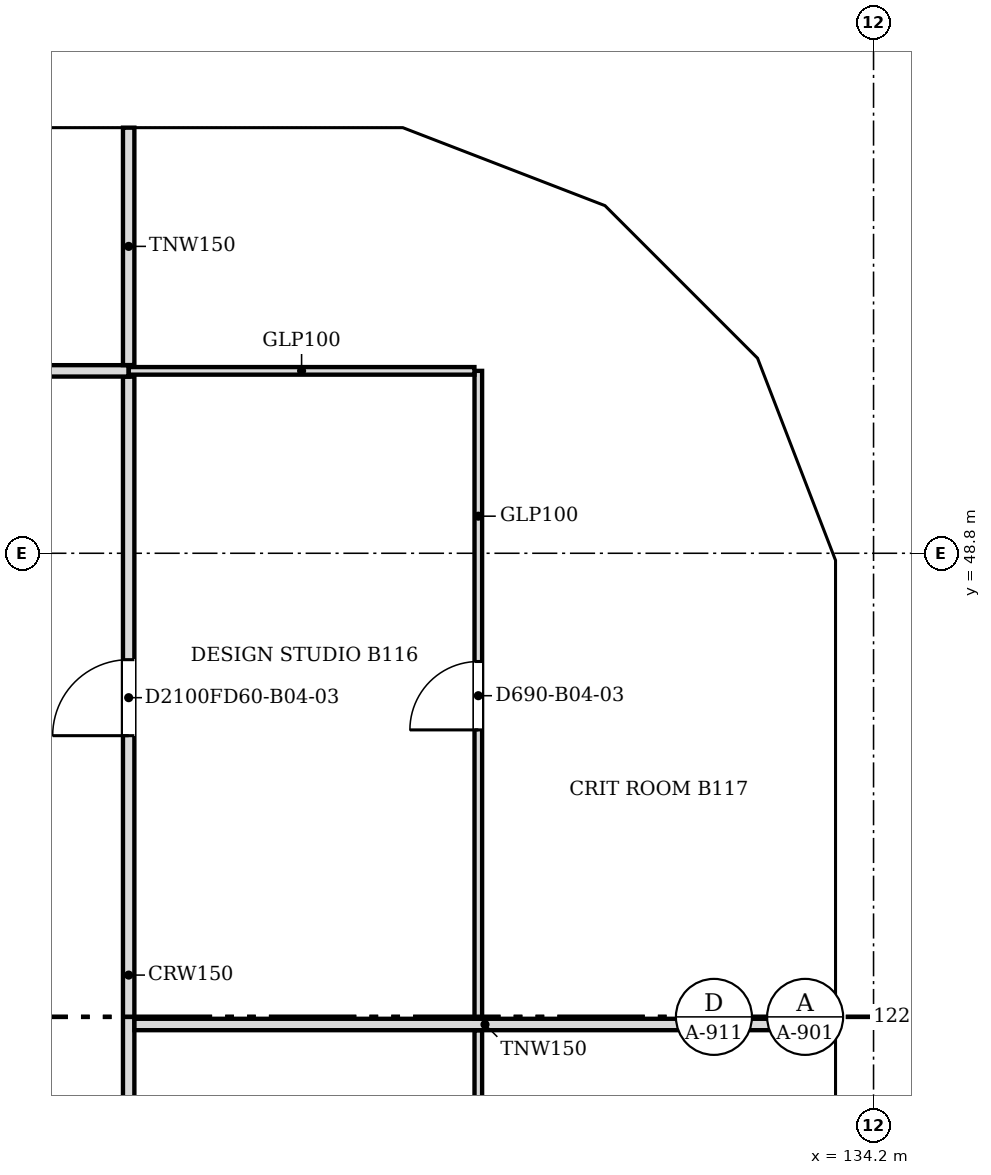
"""IFC4 building model, lengths in metres.
Left out: names, types, materials, properties, quantities, classifications, styles, units other than length and angle.
Written with IfcOpenShell. Run it as: python <this file> out.ifc"""

import sys

from ifc_helpers import new_model, si_unit, direction, frame, frame_2d, origin, place, context, subcontext, project, spatial, polyline, rectangle, outline, extrude, faceted_brep, source, transform, mapped, element, fill, save


model = new_model("IFC4")
c1 = context("Model", 3, precision=1e-05, world=origin(), true_north=direction((0.0, 1.0)))
c2 = subcontext(c1, "Body", "Model", "MODEL_VIEW")
j1 = project(units=[si_unit("LENGTHUNIT", "METRE"), si_unit("PLANEANGLEUNIT", "RADIAN")], contexts=[c1])
p1 = place(None, origin())
s1 = spatial("IfcSite", under=j1, at=p1, CompositionType="ELEMENT")
p2 = place(p1, origin())
s2 = spatial("IfcBuilding", under=s1, at=p2, CompositionType="ELEMENT")
p3 = place(p2, frame((0.0, 0.0, 41.0)))
s3 = spatial("IfcBuildingStorey", under=s2, at=p3, CompositionType="ELEMENT", Elevation=41.0)
m1 = source(origin(), c2, "Body", "Brep", [
    faceted_brep([(3.05, -0.25, 0.0), (6.1, -0.25, 3.8), (6.1, -0.25, 3.8), (3.05, -0.25, 7.6), (0.0, -0.25, 3.8), (0.0, 0.25, 3.8), (3.05, 0.25, 7.6), (6.1, 0.25, 3.8), (6.1, 0.25, 3.8), (3.05, 0.25, 0.0)], [[[0, 1, 2, 3, 4]], [[5, 6, 7, 8, 9]], [[9, 8, 1, 0]], [[7, 6, 3, 2]], [[6, 5, 4, 3]], [[5, 9, 0, 4]], [[1, 8, 7, 2]]]),
])
p4 = place(p3, frame((133.95, 36.6, -3.8), z_axis=(0.0, 0.0, 1.0), x_axis=(0.0, 1.0, 0.0)))
e1 = element("IfcWall", 1, at=p4, inside=s3, PredefinedType="SOLIDWALL", context=c2, shape_type="MappedRepresentation", body=[
    mapped(m1, transform((0.0, 0.0, 0.0), scale=1.0)),
])
m2 = source(origin(), c2, "Body", "SweptSolid", [
    extrude(outline(polyline([(3.05, 0.399), (5.78, 3.8), (3.05, 7.201), (0.321, 3.8), (3.05, 0.399)])), frame((0.0, 0.26, 0.0), z_axis=(0.0, -1.0, 0.0), x_axis=(1.0, 0.0, 0.0)), (0.0, 0.0, 1.0), 0.52),
])
p5 = place(p4, origin())
e2 = element("IfcOpeningElement", 2, at=p5, cuts=e1, PredefinedType="OPENING", context=c2, shape_type="MappedRepresentation", body=[
    mapped(m2, transform((0.0, 0.0, 0.0), scale=1.0)),
])
m3 = source(origin(), c2, "Body", "Brep", [
    faceted_brep([(3.05, -0.25, 0.0), (6.053, -0.25, 3.8), (3.05, -0.25, 7.6), (0.0, -0.25, 3.8), (0.0, 0.25, 3.8), (3.05, 0.25, 7.6), (6.007, 0.25, 3.859), (6.007, 0.25, 3.741), (3.05, 0.25, 0.0), (6.053, 0.0, 3.8)], [[[0, 1, 2, 3]], [[4, 5, 6, 7, 8]], [[8, 7, 9, 1, 0]], [[6, 5, 2, 1, 9]], [[5, 4, 3, 2]], [[4, 8, 0, 3]], [[9, 7, 6]]]),
])
p6 = place(p3, frame((133.95, 42.7, -3.8), z_axis=(0.0, 0.0, 1.0), x_axis=(0.0, 1.0, 0.0)))
e3 = element("IfcWall", 3, at=p6, inside=s3, PredefinedType="SOLIDWALL", context=c2, shape_type="MappedRepresentation", body=[
    mapped(m3, transform((0.0, 0.0, 0.0), scale=1.0)),
])
m4 = source(origin(), c2, "Body", "SweptSolid", [
    extrude(outline(polyline([(3.049, 0.401), (5.735, 3.8), (3.049, 7.199), (0.321, 3.8), (3.049, 0.401)])), frame((0.0, 0.26, 0.0), z_axis=(0.0, -1.0, 0.0), x_axis=(1.0, 0.0, 0.0)), (0.0, 0.0, 1.0), 0.52),
])
p7 = place(p6, origin())
e4 = element("IfcOpeningElement", 4, at=p7, cuts=e3, PredefinedType="OPENING", context=c2, shape_type="MappedRepresentation", body=[
    mapped(m4, transform((0.0, 0.0, 0.0), scale=1.0)),
])
m5 = source(origin(), c2, "Body", "Brep", [
    faceted_brep([(2.95, -0.25, 0.0), (3.003, -0.25, 0.068), (3.003, -0.25, 7.532), (2.95, -0.25, 7.6), (0.0, -0.25, 3.8), (0.047, 0.25, 3.86), (2.898, 0.25, 7.532), (2.898, 0.25, 0.068), (0.047, 0.25, 3.74), (2.95, 0.0, 0.0), (2.95, 0.0, 7.6), (0.0, 0.0, 3.8)], [[[0, 1, 2, 3, 4]], [[5, 6, 7, 8]], [[1, 0, 9]], [[10, 3, 2]], [[6, 5, 11, 4, 3, 10]], [[8, 7, 9, 0, 4, 11]], [[8, 11, 5]], [[1, 9, 7, 6, 10, 2]]]),
])
p8 = place(p3, frame((133.95, 48.753, -3.8), z_axis=(0.0, 0.0, 1.0), x_axis=(-0.359855894603, 0.933007896601, 0.0)))
e5 = element("IfcWall", 5, at=p8, inside=s3, PredefinedType="SOLIDWALL", context=c2, shape_type="MappedRepresentation", body=[
    mapped(m5, transform((0.0, 0.0, 0.0), scale=1.0)),
])
m6 = source(origin(), c2, "Body", "SweptSolid", [
    extrude(outline(polyline([(2.75, 6.935), (0.316, 3.8), (2.75, 0.665), (2.75, 6.935)])), frame((0.0, 0.26, 0.0), z_axis=(0.0, -1.0, 0.0), x_axis=(1.0, 0.0, 0.0)), (0.0, 0.0, 1.0), 0.52),
])
p9 = place(p8, origin())
e6 = element("IfcOpeningElement", 6, at=p9, cuts=e5, PredefinedType="OPENING", context=c2, shape_type="MappedRepresentation", body=[
    mapped(m6, transform((0.0, 0.0, 0.0), scale=1.0)),
])
m7 = source(origin(), c2, "Body", "Brep", [
    faceted_brep([(0.053, -0.25, 0.0), (2.997, -0.25, 3.8), (0.053, -0.25, 7.6), (0.0, -0.25, 7.532), (0.0, -0.25, 0.068), (0.106, 0.25, 7.532), (2.944, 0.25, 3.868), (2.944, 0.25, 3.732), (0.106, 0.25, 0.068), (2.997, 0.0, 3.8), (0.053, 0.0, 0.0), (0.053, 0.0, 7.6)], [[[0, 1, 2, 3, 4]], [[5, 6, 7, 8]], [[8, 7, 9, 1, 0, 10]], [[6, 5, 11, 2, 1, 9]], [[3, 2, 11]], [[10, 0, 4]], [[8, 10, 4, 3, 11, 5]], [[9, 7, 6]]]),
])
p10 = place(p3, frame((132.926, 51.469, -3.8), z_axis=(0.0, 0.0, 1.0), x_axis=(-0.707066050402, 0.707147509625, 0.0)))
e7 = element("IfcWall", 7, at=p10, inside=s3, PredefinedType="SOLIDWALL", context=c2, shape_type="MappedRepresentation", body=[
    mapped(m7, transform((0.0, 0.0, 0.0), scale=1.0)),
])
m8 = source(origin(), c2, "Body", "SweptSolid", [
    extrude(outline(polyline([(0.253, 0.666), (2.681, 3.8), (0.253, 6.934), (0.253, 0.666)])), frame((0.0, 0.26, 0.0), z_axis=(0.0, -1.0, 0.0), x_axis=(1.0, 0.0, 0.0)), (0.0, 0.0, 1.0), 0.52),
])
p11 = place(p10, origin())
e8 = element("IfcOpeningElement", 8, at=p11, cuts=e7, PredefinedType="OPENING", context=c2, shape_type="MappedRepresentation", body=[
    mapped(m8, transform((0.0, 0.0, 0.0), scale=1.0)),
])
m9 = source(origin(), c2, "Body", "Brep", [
    faceted_brep([(2.95, -0.25, 0.0), (2.997, -0.25, 0.059), (2.997, -0.25, 7.541), (2.95, -0.25, 7.6), (0.0, -0.25, 3.8), (0.053, 0.25, 3.868), (2.904, 0.25, 7.54), (2.904, 0.25, 0.06), (0.053, 0.25, 3.732), (2.95, 0.0, 0.0), (2.95, 0.0, 7.6), (0.0, 0.0, 3.8)], [[[0, 1, 2, 3, 4]], [[5, 6, 7, 8]], [[1, 0, 9]], [[10, 3, 2]], [[6, 5, 11, 4, 3, 10]], [[8, 7, 9, 0, 4, 11]], [[8, 11, 5]], [[1, 9, 7, 6, 10, 2]]]),
])
p12 = place(p3, frame((130.806, 53.588, -3.8), z_axis=(0.0, 0.0, 1.0), x_axis=(-0.932990326376, 0.359901446078, 0.0)))
e9 = element("IfcWall", 9, at=p12, inside=s3, PredefinedType="SOLIDWALL", context=c2, shape_type="MappedRepresentation", body=[
    mapped(m9, transform((0.0, 0.0, 0.0), scale=1.0)),
])
p13 = place(p12, origin())
e10 = element("IfcOpeningElement", 10, at=p13, cuts=e9, PredefinedType="OPENING", context=c2, shape_type="MappedRepresentation", body=[
    mapped(m6, transform((0.0, 0.0, 0.0), scale=1.0)),
])
m10 = source(origin(), c2, "Body", "Brep", [
    faceted_brep([(0.047, -0.25, 0.0), (3.05, -0.25, 3.8), (0.047, -0.25, 7.6), (0.0, -0.25, 7.54), (0.0, -0.25, 0.06), (0.093, 0.25, 7.541), (3.05, 0.25, 3.8), (0.093, 0.25, 0.059), (0.047, 0.0, 0.0), (0.047, 0.0, 7.6)], [[[0, 1, 2, 3, 4]], [[5, 6, 7]], [[7, 6, 1, 0, 8]], [[6, 5, 9, 2, 1]], [[3, 2, 9]], [[8, 0, 4]], [[7, 8, 4, 3, 9, 5]]]),
])
p14 = place(p3, frame((128.1, 54.65, -3.8), z_axis=(0.0, 0.0, 1.0), x_axis=(-1.0, 0.0, 0.0)))
e11 = element("IfcWall", 11, at=p14, inside=s3, PredefinedType="SOLIDWALL", context=c2, shape_type="MappedRepresentation", body=[
    mapped(m10, transform((0.0, 0.0, 0.0), scale=1.0)),
])
m11 = source(origin(), c2, "Body", "SweptSolid", [
    extrude(outline(polyline([(0.247, 0.656), (2.731, 3.8), (0.247, 6.944), (0.247, 0.656)])), frame((0.0, 0.26, 0.0), z_axis=(0.0, -1.0, 0.0), x_axis=(1.0, 0.0, 0.0)), (0.0, 0.0, 1.0), 0.52),
])
p15 = place(p14, origin())
e12 = element("IfcOpeningElement", 12, at=p15, cuts=e11, PredefinedType="OPENING", context=c2, shape_type="MappedRepresentation", body=[
    mapped(m11, transform((0.0, 0.0, 0.0), scale=1.0)),
])
m12 = source(origin(), c2, "Body", "SweptSolid", [
    extrude(outline(polyline([(3.05, 0.0), (6.1, 3.8), (3.05, 7.6), (0.0, 3.8), (3.05, 0.0)])), frame((0.0, 0.25, 0.0), z_axis=(0.0, -1.0, 0.0), x_axis=(1.0, 0.0, 0.0)), (0.0, 0.0, 1.0), 0.5),
])
p16 = place(p3, frame((125.05, 54.65, -3.8), z_axis=(0.0, 0.0, 1.0), x_axis=(-1.0, 0.0, 0.0)))
e13 = element("IfcWall", 13, at=p16, inside=s3, PredefinedType="SOLIDWALL", context=c2, shape_type="MappedRepresentation", body=[
    mapped(m12, transform((0.0, 0.0, 0.0), scale=1.0)),
])
p17 = place(p16, origin())
e14 = element("IfcOpeningElement", 14, at=p17, cuts=e13, PredefinedType="OPENING", context=c2, shape_type="MappedRepresentation", body=[
    mapped(m2, transform((0.0, 0.0, 0.0), scale=1.0)),
])
p18 = place(p2, frame((0.0, 0.0, 44.8)))
s4 = spatial("IfcBuildingStorey", under=s2, at=p18, CompositionType="ELEMENT", Elevation=44.8)
p19 = place(p18, frame((133.95, 39.65, -3.8), z_axis=(0.0, 0.0, 1.0), x_axis=(0.0, 1.0, 0.0)))
e15 = element("IfcWall", 15, at=p19, inside=s4, PredefinedType="SOLIDWALL", context=c2, shape_type="MappedRepresentation", body=[
    mapped(m12, transform((0.0, 0.0, 0.0), scale=1.0)),
])
p20 = place(p19, origin())
e16 = element("IfcOpeningElement", 16, at=p20, cuts=e15, PredefinedType="OPENING", context=c2, shape_type="MappedRepresentation", body=[
    mapped(m2, transform((0.0, 0.0, 0.0), scale=1.0)),
])
m13 = source(origin(), c2, "Body", "Brep", [
    faceted_brep([(3.003, -0.25, 0.0), (3.05, -0.25, 0.06), (3.05, -0.25, 7.54), (3.003, -0.25, 7.6), (0.0, -0.25, 3.8), (0.0, 0.25, 3.8), (2.957, 0.25, 7.541), (2.957, 0.25, 0.059), (3.003, 0.0, 0.0), (3.003, 0.0, 7.6)], [[[0, 1, 2, 3, 4]], [[5, 6, 7]], [[1, 0, 8]], [[9, 3, 2]], [[6, 5, 4, 3, 9]], [[5, 7, 8, 0, 4]], [[1, 8, 7, 6, 9, 2]]]),
])
p21 = place(p18, frame((133.95, 45.75, -3.8), z_axis=(0.0, 0.0, 1.0), x_axis=(0.0, 1.0, 0.0)))
e17 = element("IfcWall", 17, at=p21, inside=s4, PredefinedType="SOLIDWALL", context=c2, shape_type="MappedRepresentation", body=[
    mapped(m13, transform((0.0, 0.0, 0.0), scale=1.0)),
])
m14 = source(origin(), c2, "Body", "SweptSolid", [
    extrude(outline(polyline([(2.803, 6.944), (0.319, 3.8), (2.803, 0.656), (2.803, 6.944)])), frame((0.0, 0.26, 0.0), z_axis=(0.0, -1.0, 0.0), x_axis=(1.0, 0.0, 0.0)), (0.0, 0.0, 1.0), 0.52),
])
p22 = place(p21, origin())
e18 = element("IfcOpeningElement", 18, at=p22, cuts=e17, PredefinedType="OPENING", context=c2, shape_type="MappedRepresentation", body=[
    mapped(m14, transform((0.0, 0.0, 0.0), scale=1.0)),
])
m15 = source(origin(), c2, "Body", "Brep", [
    faceted_brep([(0.047, -0.25, 0.0), (2.997, -0.25, 3.8), (0.047, -0.25, 7.6), (0.0, -0.25, 7.541), (0.0, -0.25, 0.059), (0.093, 0.25, 7.54), (2.944, 0.25, 3.868), (2.944, 0.25, 3.732), (0.093, 0.25, 0.06), (2.997, 0.0, 3.8), (0.047, 0.0, 0.0), (0.047, 0.0, 7.6)], [[[0, 1, 2, 3, 4]], [[5, 6, 7, 8]], [[8, 7, 9, 1, 0, 10]], [[6, 5, 11, 2, 1, 9]], [[3, 2, 11]], [[10, 0, 4]], [[8, 10, 4, 3, 11, 5]], [[9, 7, 6]]]),
])
p23 = place(p18, frame((133.967, 48.71, -3.8), z_axis=(0.0, 0.0, 1.0), x_axis=(-0.359901446078, 0.932990326376, 0.0)))
e19 = element("IfcWall", 19, at=p23, inside=s4, PredefinedType="SOLIDWALL", context=c2, shape_type="MappedRepresentation", body=[
    mapped(m15, transform((0.0, 0.0, 0.0), scale=1.0)),
])
m16 = source(origin(), c2, "Body", "SweptSolid", [
    extrude(outline(polyline([(0.247, 0.665), (2.681, 3.8), (0.247, 6.935), (0.247, 0.665)])), frame((0.0, 0.26, 0.0), z_axis=(0.0, -1.0, 0.0), x_axis=(1.0, 0.0, 0.0)), (0.0, 0.0, 1.0), 0.52),
])
p24 = place(p23, origin())
e20 = element("IfcOpeningElement", 20, at=p24, cuts=e19, PredefinedType="OPENING", context=c2, shape_type="MappedRepresentation", body=[
    mapped(m16, transform((0.0, 0.0, 0.0), scale=1.0)),
])
m17 = source(origin(), c2, "Body", "Brep", [
    faceted_brep([(2.944, -0.25, 0.0), (2.997, -0.25, 0.068), (2.997, -0.25, 7.532), (2.944, -0.25, 7.6), (0.0, -0.25, 3.8), (0.053, 0.25, 3.868), (2.891, 0.25, 7.532), (2.891, 0.25, 0.068), (0.053, 0.25, 3.732), (2.944, 0.0, 0.0), (2.944, 0.0, 7.6), (0.0, 0.0, 3.8)], [[[0, 1, 2, 3, 4]], [[5, 6, 7, 8]], [[1, 0, 9]], [[10, 3, 2]], [[6, 5, 11, 4, 3, 10]], [[8, 7, 9, 0, 4, 11]], [[8, 11, 5]], [[1, 9, 7, 6, 10, 2]]]),
])
p25 = place(p18, frame((132.888, 51.506, -3.8), z_axis=(0.0, 0.0, 1.0), x_axis=(-0.707147509625, 0.707066050402, 0.0)))
e21 = element("IfcWall", 21, at=p25, inside=s4, PredefinedType="SOLIDWALL", context=c2, shape_type="MappedRepresentation", body=[
    mapped(m17, transform((0.0, 0.0, 0.0), scale=1.0)),
])
m18 = source(origin(), c2, "Body", "SweptSolid", [
    extrude(outline(polyline([(2.744, 6.934), (0.316, 3.8), (2.744, 0.666), (2.744, 6.934)])), frame((0.0, 0.26, 0.0), z_axis=(0.0, -1.0, 0.0), x_axis=(1.0, 0.0, 0.0)), (0.0, 0.0, 1.0), 0.52),
])
p26 = place(p25, origin())
e22 = element("IfcOpeningElement", 22, at=p26, cuts=e21, PredefinedType="OPENING", context=c2, shape_type="MappedRepresentation", body=[
    mapped(m18, transform((0.0, 0.0, 0.0), scale=1.0)),
])
m19 = source(origin(), c2, "Body", "Brep", [
    faceted_brep([(0.053, -0.25, 0.0), (3.003, -0.25, 3.8), (0.053, -0.25, 7.6), (0.0, -0.25, 7.532), (0.0, -0.25, 0.068), (0.106, 0.25, 7.532), (2.957, 0.25, 3.86), (2.957, 0.25, 3.74), (0.106, 0.25, 0.068), (3.003, 0.0, 3.8), (0.053, 0.0, 0.0), (0.053, 0.0, 7.6)], [[[0, 1, 2, 3, 4]], [[5, 6, 7, 8]], [[8, 7, 9, 1, 0, 10]], [[6, 5, 11, 2, 1, 9]], [[3, 2, 11]], [[10, 0, 4]], [[8, 10, 4, 3, 11, 5]], [[9, 7, 6]]]),
])
p27 = place(p18, frame((130.856, 53.569, -3.8), z_axis=(0.0, 0.0, 1.0), x_axis=(-0.933007896601, 0.359855894603, 0.0)))
e23 = element("IfcWall", 23, at=p27, inside=s4, PredefinedType="SOLIDWALL", context=c2, shape_type="MappedRepresentation", body=[
    mapped(m19, transform((0.0, 0.0, 0.0), scale=1.0)),
])
m20 = source(origin(), c2, "Body", "SweptSolid", [
    extrude(outline(polyline([(0.253, 0.665), (2.687, 3.8), (0.253, 6.935), (0.253, 0.665)])), frame((0.0, 0.26, 0.0), z_axis=(0.0, -1.0, 0.0), x_axis=(1.0, 0.0, 0.0)), (0.0, 0.0, 1.0), 0.52),
])
p28 = place(p27, origin())
e24 = element("IfcOpeningElement", 24, at=p28, cuts=e23, PredefinedType="OPENING", context=c2, shape_type="MappedRepresentation", body=[
    mapped(m20, transform((0.0, 0.0, 0.0), scale=1.0)),
])
m21 = source(origin(), c2, "Body", "Brep", [
    faceted_brep([(3.003, -0.25, 0.0), (6.053, -0.25, 3.8), (3.003, -0.25, 7.6), (0.0, -0.25, 3.8), (0.047, 0.25, 3.859), (3.003, 0.25, 7.6), (6.053, 0.25, 3.8), (3.003, 0.25, 0.0), (0.047, 0.25, 3.741), (0.0, 0.0, 3.8)], [[[0, 1, 2, 3]], [[4, 5, 6, 7, 8]], [[7, 6, 1, 0]], [[6, 5, 2, 1]], [[5, 4, 9, 3, 2]], [[8, 7, 0, 3, 9]], [[8, 9, 4]]]),
])
p29 = place(p18, frame((128.053, 54.65, -3.8), z_axis=(0.0, 0.0, 1.0), x_axis=(-1.0, 0.0, 0.0)))
e25 = element("IfcWall", 25, at=p29, inside=s4, PredefinedType="SOLIDWALL", context=c2, shape_type="MappedRepresentation", body=[
    mapped(m21, transform((0.0, 0.0, 0.0), scale=1.0)),
])
m22 = source(origin(), c2, "Body", "SweptSolid", [
    extrude(outline(polyline([(3.005, 0.401), (5.733, 3.8), (3.005, 7.199), (0.319, 3.8), (3.005, 0.401)])), frame((0.0, 0.26, 0.0), z_axis=(0.0, -1.0, 0.0), x_axis=(1.0, 0.0, 0.0)), (0.0, 0.0, 1.0), 0.52),
])
p30 = place(p29, origin())
e26 = element("IfcOpeningElement", 26, at=p30, cuts=e25, PredefinedType="OPENING", context=c2, shape_type="MappedRepresentation", body=[
    mapped(m22, transform((0.0, 0.0, 0.0), scale=1.0)),
])
p31 = place(p3, frame((124.4, 51.124, 0.0), z_axis=(0.0, 0.0, 1.0), x_axis=(0.0, -1.0, 0.0)))
e27 = element("IfcWall", 27, at=p31, inside=s3, PredefinedType="PARTITIONING", context=c2, shape_type="SweptSolid", body=[
    extrude(rectangle(XDim=14.524, YDim=0.15, at=frame_2d((7.262, 0.0))), origin(), (0.0, 0.0, 1.0), 3.067),
])
m23 = source(origin(), c2, "Body", "SweptSolid", [
    extrude(rectangle(XDim=1.0, YDim=2.1, at=frame_2d((0.5, 1.05))), frame((0.0, 0.085, 0.0), z_axis=(0.0, -1.0, 0.0), x_axis=(1.0, 0.0, 0.0)), (0.0, 0.0, 1.0), 0.17),
])
p32 = place(p31, frame((3.724, 0.0, 0.0)))
e28 = element("IfcOpeningElement", 28, at=p32, cuts=e27, PredefinedType="OPENING", context=c2, shape_type="MappedRepresentation", body=[
    mapped(m23, transform((0.0, 0.0, 0.0), scale=1.0)),
])
p33 = place(p31, frame((11.024, 0.0, 0.0)))
e29 = element("IfcOpeningElement", 29, at=p33, cuts=e27, PredefinedType="OPENING", context=c2, shape_type="MappedRepresentation", body=[
    mapped(m23, transform((0.0, 0.0, 0.0), scale=1.0)),
])
p34 = place(p3, frame((129.0, 42.524, 0.0), z_axis=(0.0, 0.0, 1.0), x_axis=(0.0, -1.0, 0.0)))
e30 = element("IfcWall", 30, at=p34, inside=s3, PredefinedType="PARTITIONING", context=c2, shape_type="SweptSolid", body=[
    extrude(rectangle(XDim=5.848, YDim=0.1, at=frame_2d((2.924, 0.0))), origin(), (0.0, 0.0, 1.0), 3.067),
])
m24 = source(origin(), c2, "Body", "SweptSolid", [
    extrude(rectangle(XDim=0.9, YDim=2.1, at=frame_2d((0.45, 1.05))), frame((0.0, 0.06, 0.0), z_axis=(0.0, -1.0, 0.0), x_axis=(1.0, 0.0, 0.0)), (0.0, 0.0, 1.0), 0.12),
])
p35 = place(p34, frame((2.448, 0.0, 0.0)))
e31 = element("IfcOpeningElement", 31, at=p35, cuts=e30, PredefinedType="OPENING", context=c2, shape_type="MappedRepresentation", body=[
    mapped(m24, transform((0.0, 0.0, 0.0), scale=1.0)),
])
p36 = place(p3, frame((124.476, 42.6, 0.0), z_axis=(0.0, 0.0, 1.0), x_axis=(1.0, 0.0, 0.0)))
e32 = element("IfcWall", 32, at=p36, inside=s3, PredefinedType="PARTITIONING", context=c2, shape_type="SweptSolid", body=[
    extrude(rectangle(XDim=9.224, YDim=0.15, at=frame_2d((4.612, 0.0))), origin(), (0.0, 0.0, 1.0), 3.067),
])
p37 = place(p3, frame((129.0, 51.2, 0.0), z_axis=(0.0, 0.0, 1.0), x_axis=(0.0, -1.0, 0.0)))
e33 = element("IfcWall", 33, at=p37, inside=s3, PredefinedType="PARTITIONING", context=c2, shape_type="SweptSolid", body=[
    extrude(rectangle(XDim=8.524, YDim=0.1, at=frame_2d((4.262, 0.0))), origin(), (0.0, 0.0, 1.0), 3.067),
])
p38 = place(p37, frame((3.824, 0.0, 0.0)))
e34 = element("IfcOpeningElement", 34, at=p38, cuts=e33, PredefinedType="OPENING", context=c2, shape_type="MappedRepresentation", body=[
    mapped(m24, transform((0.0, 0.0, 0.0), scale=1.0)),
])
p39 = place(p3, frame((108.5, 51.2, 0.0), z_axis=(0.0, 0.0, 1.0), x_axis=(1.0, 0.0, 0.0)))
e35 = element("IfcWall", 35, at=p39, inside=s3, PredefinedType="PARTITIONING", context=c2, shape_type="SweptSolid", body=[
    extrude(rectangle(XDim=15.9, YDim=0.15, at=frame_2d((7.95, 0.0))), origin(), (0.0, 0.0, 1.0), 3.067),
])
m25 = source(origin(), c2, "Body", "SweptSolid", [
    extrude(rectangle(XDim=0.9, YDim=2.1, at=frame_2d((0.45, 1.05))), frame((0.0, 0.085, 0.0), z_axis=(0.0, -1.0, 0.0), x_axis=(1.0, 0.0, 0.0)), (0.0, 0.0, 1.0), 0.17),
])
p40 = place(p39, frame((7.5, 0.0, 0.0)))
e36 = element("IfcOpeningElement", 36, at=p40, cuts=e35, PredefinedType="OPENING", context=c2, shape_type="MappedRepresentation", body=[
    mapped(m25, transform((0.0, 0.0, 0.0), scale=1.0)),
])
p41 = place(p3, frame((124.401, 51.2, 0.0), z_axis=(0.0, 0.0, 1.0), x_axis=(1.0, 0.0, 0.0)))
e37 = element("IfcWall", 37, at=p41, inside=s3, PredefinedType="PARTITIONING", context=c2, shape_type="SweptSolid", body=[
    extrude(rectangle(XDim=4.548, YDim=0.1, at=frame_2d((2.274, 0.0))), origin(), (0.0, 0.0, 1.0), 3.067),
])
p42 = place(p3, frame((124.4, 51.276, 0.0), z_axis=(0.0, 0.0, 1.0), x_axis=(0.0, 1.0, 0.0)))
e38 = element("IfcWall", 38, at=p42, inside=s3, PredefinedType="PARTITIONING", context=c2, shape_type="SweptSolid", body=[
    extrude(rectangle(XDim=3.124, YDim=0.15, at=frame_2d((1.562, 0.0))), origin(), (0.0, 0.0, 1.0), 3.067),
])
m26 = source(origin(), c2, "Body", "SweptSolid", [
    extrude(rectangle(XDim=1.0, YDim=2.1, at=frame_2d((0.5, 1.05))), frame((0.0, 0.025, 0.0), z_axis=(0.0, -1.0, 0.0), x_axis=(1.0, 0.0, 0.0)), (0.0, 0.0, 1.0), 0.05),
])
p43 = place(p32, origin())
e39 = element("IfcDoor", 39, at=p43, inside=s3, OperationType="SINGLE_SWING_RIGHT", PredefinedType="DOOR", context=c2, shape_type="MappedRepresentation", body=[
    mapped(m26, transform((0.0, 0.0, 0.0), scale=1.0)),
])
fill(e28, e39)
m27 = source(origin(), c2, "Body", "SweptSolid", [
    extrude(rectangle(XDim=0.9, YDim=2.1, at=frame_2d((0.45, 1.05))), frame((0.0, 0.025, 0.0), z_axis=(0.0, -1.0, 0.0), x_axis=(1.0, 0.0, 0.0)), (0.0, 0.0, 1.0), 0.05),
])
p44 = place(p38, origin())
e40 = element("IfcDoor", 40, at=p44, inside=s3, OperationType="SINGLE_SWING_RIGHT", PredefinedType="DOOR", context=c2, shape_type="MappedRepresentation", body=[
    mapped(m27, transform((0.0, 0.0, 0.0), scale=1.0)),
])
fill(e34, e40)
save(model, sys.argv[1])
